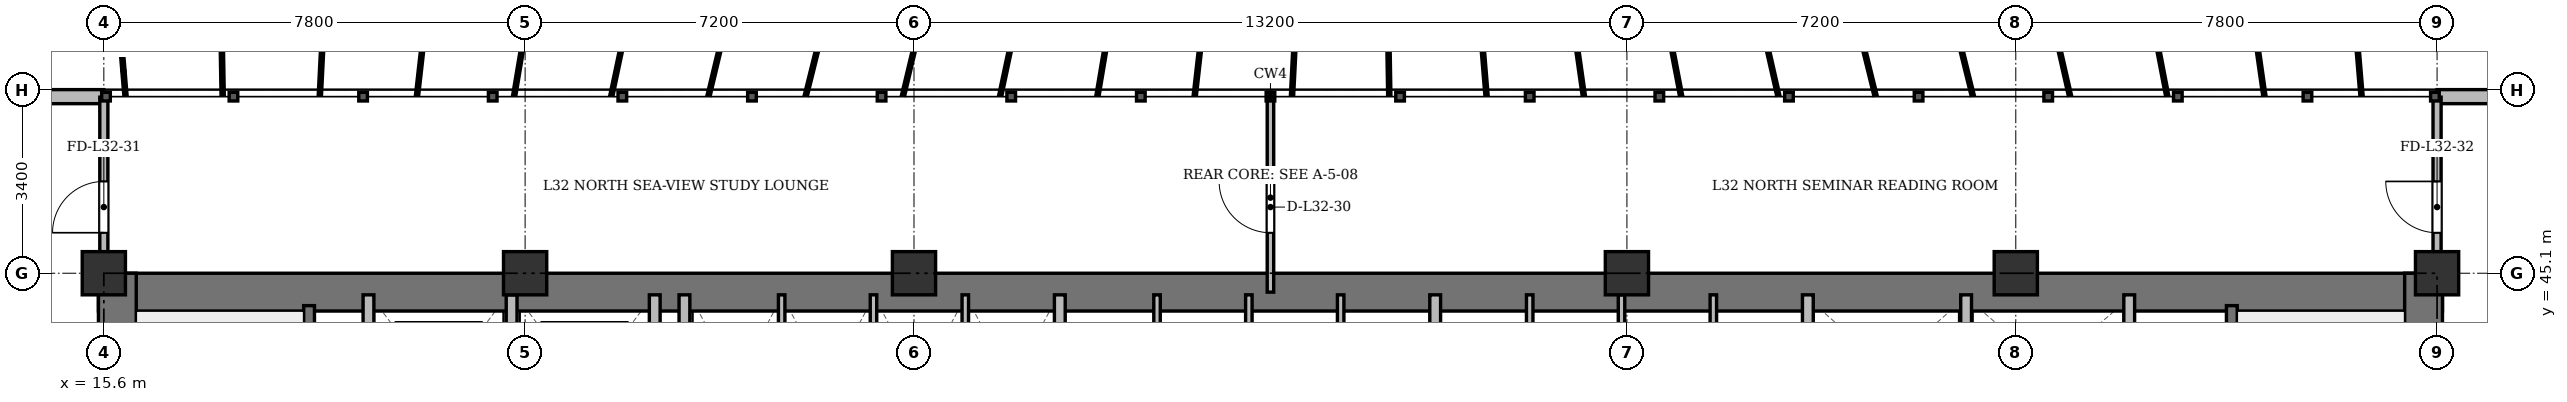
"""IFC4 building model, lengths in metres.
Left out: names, types, materials, properties, quantities, classifications, styles, units other than length and angle.
Written with IfcOpenShell. Run it as: python <this file> out.ifc"""

import sys

from ifc_helpers import new_model, si_unit, direction, frame, frame_2d, origin, origin_2d, place, context, subcontext, project, spatial, rectangle, extrude, source, transform, mapped, element, fill, save


model = new_model("IFC4")
c1 = context("Model", 3, precision=1e-05, world=origin(), true_north=direction((0.0, 1.0)))
c2 = subcontext(c1, "Body", "Model", "MODEL_VIEW")
j1 = project(units=[si_unit("LENGTHUNIT", "METRE"), si_unit("PLANEANGLEUNIT", "RADIAN")], contexts=[c1])
p1 = place(None, origin())
s1 = spatial("IfcSite", under=j1, at=p1, CompositionType="ELEMENT")
p2 = place(p1, origin())
s2 = spatial("IfcBuilding", under=s1, at=p2, CompositionType="ELEMENT")
p3 = place(p2, frame((0.0, 0.0, 124.9)))
s3 = spatial("IfcBuildingStorey", under=s2, at=p3, CompositionType="ELEMENT", Elevation=124.9)
m1 = source(origin(), c2, "Body", "SweptSolid", [
    extrude(rectangle(XDim=0.8, YDim=0.8, at=origin_2d()), origin(), (0.0, 0.0, 1.0), 3.6),
])
for number, where, z_axis, x_axis in (
    (1, (15.6, 45.1, 0.0), (0.0, 0.0, 1.0), (1.0, 0.0, 0.0)),
    (2, (23.4, 45.1, 0.0), (0.0, 0.0, 1.0), (1.0, 0.0, 0.0)),
    (3, (30.6, 45.1, 0.0), (0.0, 0.0, 1.0), (1.0, 0.0, 0.0)),
    (4, (43.8, 45.1, 0.0), (0.0, 0.0, 1.0), (1.0, 0.0, 0.0)),
    (5, (51.0, 45.1, 0.0), (0.0, 0.0, 1.0), (1.0, 0.0, 0.0)),
    (6, (58.8, 45.1, 0.0), (0.0, 0.0, 1.0), (1.0, 0.0, 0.0)),
):
    element("IfcColumn", number, at=place(p3, frame(where, z_axis=z_axis, x_axis=x_axis)), inside=s3, PredefinedType="COLUMN", context=c2, shape_type="MappedRepresentation", body=[
        mapped(m1, transform((0.0, 0.0, 0.0), x_axis=(1.0, 0.0, 0.0), y_axis=(0.0, 1.0, 0.0), z_axis=(0.0, 0.0, 1.0), scale=1.0)),
    ])
p4 = place(p3, frame((7.6, 48.37, 0.0), z_axis=(0.0, 0.0, 1.0), x_axis=(1.0, 0.0, 0.0)))
e7 = element("IfcWall", 7, at=p4, inside=s3, PredefinedType="SOLIDWALL", context=c2, shape_type="SweptSolid", body=[
    extrude(rectangle(XDim=8.0, YDim=0.26, at=frame_2d((4.0, 0.0))), origin(), (0.0, 0.0, 1.0), 3.34),
])
p5 = place(p4, frame((3.308, 0.0, 0.9)))
e8 = element("IfcOpeningElement", 8, at=p5, cuts=e7, PredefinedType="OPENING", context=c2, shape_type="SweptSolid", body=[
    extrude(rectangle(XDim=1.2, YDim=1.65, at=frame_2d((0.6, 0.825))), frame((0.0, 0.14, 0.0), z_axis=(0.0, -1.0, 0.0), x_axis=(1.0, 0.0, 0.0)), (0.0, 0.0, 1.0), 0.28),
])
p6 = place(p3, frame((58.8, 48.37, 0.0), z_axis=(0.0, 0.0, 1.0), x_axis=(1.0, 0.0, 0.0)))
e9 = element("IfcWall", 9, at=p6, inside=s3, PredefinedType="SOLIDWALL", context=c2, shape_type="SweptSolid", body=[
    extrude(rectangle(XDim=8.0, YDim=0.26, at=frame_2d((4.0, 0.0))), origin(), (0.0, 0.0, 1.0), 3.34),
])
p7 = place(p6, frame((2.192, 0.0, 0.9)))
e10 = element("IfcOpeningElement", 10, at=p7, cuts=e9, PredefinedType="OPENING", context=c2, shape_type="SweptSolid", body=[
    extrude(rectangle(XDim=1.2, YDim=1.65, at=frame_2d((0.6, 0.825))), frame((0.0, 0.14, 0.0), z_axis=(0.0, -1.0, 0.0), x_axis=(1.0, 0.0, 0.0)), (0.0, 0.0, 1.0), 0.28),
])
p8 = place(p6, frame((6.033, 0.0, 0.9)))
e11 = element("IfcOpeningElement", 11, at=p8, cuts=e9, PredefinedType="OPENING", context=c2, shape_type="SweptSolid", body=[
    extrude(rectangle(XDim=1.2, YDim=1.65, at=frame_2d((0.6, 0.825))), frame((0.0, 0.14, 0.0), z_axis=(0.0, -1.0, 0.0), x_axis=(1.0, 0.0, 0.0)), (0.0, 0.0, 1.0), 0.28),
])
p9 = place(p3, frame((15.5, 44.75, 0.0), z_axis=(0.0, 0.0, 1.0), x_axis=(1.0, 0.0, 0.0)))
e12 = element("IfcWall", 12, at=p9, inside=s3, PredefinedType="SHEAR", context=c2, shape_type="SweptSolid", body=[
    extrude(rectangle(XDim=43.4, YDim=0.7, at=frame_2d((21.7, 0.0))), origin(), (0.0, 0.0, 1.0), 3.34),
])
for number, where, z_axis, x_axis in (
    (13, (15.85, 33.4, 0.0), (0.0, 0.0, 1.0), (0.0, 1.0, 0.0)),
    (14, (58.55, 33.4, 0.0), (0.0, 0.0, 1.0), (0.0, 1.0, 0.0)),
):
    element("IfcWall", number, at=place(p3, frame(where, z_axis=z_axis, x_axis=x_axis)), inside=s3, PredefinedType="SHEAR", context=c2, shape_type="SweptSolid", body=[
        extrude(rectangle(XDim=11.7, YDim=0.7, at=frame_2d((5.85, 0.0))), origin(), (0.0, 0.0, 1.0), 3.34),
    ])
p10 = place(p3, frame((19.4, 33.4, 0.0), z_axis=(0.0, 0.0, 1.0), x_axis=(0.0, 1.0, 0.0)))
e15 = element("IfcWall", 15, at=p10, inside=s3, PredefinedType="SHEAR", context=c2, shape_type="SweptSolid", body=[
    extrude(rectangle(XDim=11.1, YDim=0.2, at=frame_2d((5.55, 0.0))), origin(), (0.0, 0.0, 1.0), 3.34),
])
p11 = place(p10, frame((0.85, 0.0, 0.0)))
e16 = element("IfcOpeningElement", 16, at=p11, cuts=e15, PredefinedType="OPENING", context=c2, shape_type="SweptSolid", body=[
    extrude(rectangle(XDim=1.1, YDim=2.15, at=frame_2d((0.55, 1.075))), frame((0.0, 0.11, 0.0), z_axis=(0.0, -1.0, 0.0), x_axis=(1.0, 0.0, 0.0)), (0.0, 0.0, 1.0), 0.22),
])
p12 = place(p3, frame((55.0, 33.4, 0.0), z_axis=(0.0, 0.0, 1.0), x_axis=(0.0, 1.0, 0.0)))
e17 = element("IfcWall", 17, at=p12, inside=s3, PredefinedType="SHEAR", context=c2, shape_type="SweptSolid", body=[
    extrude(rectangle(XDim=11.1, YDim=0.2, at=frame_2d((5.55, 0.0))), origin(), (0.0, 0.0, 1.0), 3.34),
])
p13 = place(p12, frame((0.85, 0.0, 0.0)))
e18 = element("IfcOpeningElement", 18, at=p13, cuts=e17, PredefinedType="OPENING", context=c2, shape_type="SweptSolid", body=[
    extrude(rectangle(XDim=1.1, YDim=2.15, at=frame_2d((0.55, 1.075))), frame((0.0, 0.11, 0.0), z_axis=(0.0, -1.0, 0.0), x_axis=(1.0, 0.0, 0.0)), (0.0, 0.0, 1.0), 0.22),
])
for number, where, z_axis, x_axis in (
    (19, (20.5, 41.3, 0.0), (0.0, 0.0, 1.0), (0.0, 1.0, 0.0)),
    (20, (23.15, 41.3, 0.0), (0.0, 0.0, 1.0), (0.0, 1.0, 0.0)),
    (21, (25.8, 41.3, 0.0), (0.0, 0.0, 1.0), (0.0, 1.0, 0.0)),
):
    element("IfcWall", number, at=place(p3, frame(where, z_axis=z_axis, x_axis=x_axis)), inside=s3, PredefinedType="SOLIDWALL", context=c2, shape_type="SweptSolid", body=[
        extrude(rectangle(XDim=3.4, YDim=0.2, at=frame_2d((1.7, 0.0))), origin(), (0.0, 0.0, 1.0), 3.34),
    ])
p14 = place(p3, frame((26.35, 33.4, 0.0), z_axis=(0.0, 0.0, 1.0), x_axis=(0.0, 1.0, 0.0)))
e22 = element("IfcWall", 22, at=p14, inside=s3, PredefinedType="SOLIDWALL", context=c2, shape_type="SweptSolid", body=[
    extrude(rectangle(XDim=11.3, YDim=0.2, at=frame_2d((5.65, 0.0))), origin(), (0.0, 0.0, 1.0), 2.752),
])
p15 = place(p3, frame((33.3, 41.5, 0.0), z_axis=(0.0, 0.0, 1.0), x_axis=(0.0, 1.0, 0.0)))
e23 = element("IfcWall", 23, at=p15, inside=s3, PredefinedType="SOLIDWALL", context=c2, shape_type="SweptSolid", body=[
    extrude(rectangle(XDim=3.2, YDim=0.2, at=frame_2d((1.6, 0.0))), origin(), (0.0, 0.0, 1.0), 3.34),
])
for number, where, z_axis, x_axis in (
    (24, (28.15, 41.5, 0.0), (0.0, 0.0, 1.0), (0.0, 1.0, 0.0)),
    (25, (29.85, 41.5, 0.0), (0.0, 0.0, 1.0), (0.0, 1.0, 0.0)),
    (26, (31.55, 41.5, 0.0), (0.0, 0.0, 1.0), (0.0, 1.0, 0.0)),
    (27, (35.1, 41.5, 0.0), (0.0, 0.0, 1.0), (0.0, 1.0, 0.0)),
    (28, (36.8, 41.5, 0.0), (0.0, 0.0, 1.0), (0.0, 1.0, 0.0)),
    (29, (38.5, 41.5, 0.0), (0.0, 0.0, 1.0), (0.0, 1.0, 0.0)),
):
    element("IfcWall", number, at=place(p3, frame(where, z_axis=z_axis, x_axis=x_axis)), inside=s3, PredefinedType="PARTITIONING", context=c2, shape_type="SweptSolid", body=[
        extrude(rectangle(XDim=3.2, YDim=0.12, at=frame_2d((1.6, 0.0))), origin(), (0.0, 0.0, 1.0), 3.34),
    ])
p16 = place(p3, frame((40.25, 41.5, 0.0), z_axis=(0.0, 0.0, 1.0), x_axis=(0.0, 1.0, 0.0)))
e30 = element("IfcWall", 30, at=p16, inside=s3, PredefinedType="SOLIDWALL", context=c2, shape_type="SweptSolid", body=[
    extrude(rectangle(XDim=3.2, YDim=0.2, at=frame_2d((1.6, 0.0))), origin(), (0.0, 0.0, 1.0), 3.34),
])
for number, where, z_axis, x_axis in (
    (31, (42.0, 41.5, 0.0), (0.0, 0.0, 1.0), (0.0, 1.0, 0.0)),
    (32, (43.7, 41.5, 0.0), (0.0, 0.0, 1.0), (0.0, 1.0, 0.0)),
    (33, (45.4, 41.5, 0.0), (0.0, 0.0, 1.0), (0.0, 1.0, 0.0)),
):
    element("IfcWall", number, at=place(p3, frame(where, z_axis=z_axis, x_axis=x_axis)), inside=s3, PredefinedType="PARTITIONING", context=c2, shape_type="SweptSolid", body=[
        extrude(rectangle(XDim=3.2, YDim=0.12, at=frame_2d((1.6, 0.0))), origin(), (0.0, 0.0, 1.0), 3.34),
    ])
p17 = place(p3, frame((47.15, 33.4, 0.0), z_axis=(0.0, 0.0, 1.0), x_axis=(0.0, 1.0, 0.0)))
e34 = element("IfcWall", 34, at=p17, inside=s3, PredefinedType="SOLIDWALL", context=c2, shape_type="SweptSolid", body=[
    extrude(rectangle(XDim=11.3, YDim=0.2, at=frame_2d((5.65, 0.0))), origin(), (0.0, 0.0, 1.0), 2.752),
])
for number, where, z_axis, x_axis in (
    (35, (50.08, 42.05, 0.0), (0.0, 0.0, 1.0), (0.0, 1.0, 0.0)),
    (36, (53.1, 42.05, 0.0), (0.0, 0.0, 1.0), (0.0, 1.0, 0.0)),
):
    element("IfcWall", number, at=place(p3, frame(where, z_axis=z_axis, x_axis=x_axis)), inside=s3, PredefinedType="SOLIDWALL", context=c2, shape_type="SweptSolid", body=[
        extrude(rectangle(XDim=2.65, YDim=0.2, at=frame_2d((1.325, 0.0))), origin(), (0.0, 0.0, 1.0), 3.34),
    ])
p18 = place(p3, frame((37.2, 44.75, 0.0), z_axis=(0.0, 0.0, 1.0), x_axis=(0.0, 1.0, 0.0)))
e37 = element("IfcWall", 37, at=p18, inside=s3, PredefinedType="PARTITIONING", context=c2, shape_type="SweptSolid", body=[
    extrude(rectangle(XDim=3.61, YDim=0.12, at=frame_2d((1.805, 0.0))), origin(), (0.0, 0.0, 1.0), 2.752),
])
p19 = place(p18, frame((1.1, 0.0, 0.0)))
e38 = element("IfcOpeningElement", 38, at=p19, cuts=e37, PredefinedType="OPENING", context=c2, shape_type="SweptSolid", body=[
    extrude(rectangle(XDim=0.95, YDim=2.15, at=frame_2d((0.475, 1.075))), frame((0.0, 0.07, 0.0), z_axis=(0.0, -1.0, 0.0), x_axis=(1.0, 0.0, 0.0)), (0.0, 0.0, 1.0), 0.14),
])
p20 = place(p3, frame((15.6, 44.75, 0.0), z_axis=(0.0, 0.0, 1.0), x_axis=(0.0, 1.0, 0.0)))
e39 = element("IfcWall", 39, at=p20, inside=s3, PredefinedType="PARTITIONING", context=c2, shape_type="SweptSolid", body=[
    extrude(rectangle(XDim=3.61, YDim=0.15, at=frame_2d((1.805, 0.0))), origin(), (0.0, 0.0, 1.0), 2.84),
])
p21 = place(p20, frame((1.1, 0.0, 0.0)))
e40 = element("IfcOpeningElement", 40, at=p21, cuts=e39, PredefinedType="OPENING", context=c2, shape_type="SweptSolid", body=[
    extrude(rectangle(XDim=0.95, YDim=2.15, at=frame_2d((0.475, 1.075))), frame((0.0, 0.085, 0.0), z_axis=(0.0, -1.0, 0.0), x_axis=(1.0, 0.0, 0.0)), (0.0, 0.0, 1.0), 0.17),
])
p22 = place(p3, frame((58.8, 44.75, 0.0), z_axis=(0.0, 0.0, 1.0), x_axis=(0.0, 1.0, 0.0)))
e41 = element("IfcWall", 41, at=p22, inside=s3, PredefinedType="PARTITIONING", context=c2, shape_type="SweptSolid", body=[
    extrude(rectangle(XDim=3.61, YDim=0.15, at=frame_2d((1.805, 0.0))), origin(), (0.0, 0.0, 1.0), 2.84),
])
p23 = place(p22, frame((1.1, 0.0, 0.0)))
e42 = element("IfcOpeningElement", 42, at=p23, cuts=e41, PredefinedType="OPENING", context=c2, shape_type="SweptSolid", body=[
    extrude(rectangle(XDim=0.95, YDim=2.15, at=frame_2d((0.475, 1.075))), frame((0.0, 0.085, 0.0), z_axis=(0.0, -1.0, 0.0), x_axis=(1.0, 0.0, 0.0)), (0.0, 0.0, 1.0), 0.17),
])
m2 = source(origin(), c2, "Body", "SweptSolid", [
    extrude(rectangle(XDim=0.95, YDim=2.15, at=frame_2d((0.475, 1.075))), frame((0.0, 0.025, 0.0), z_axis=(0.0, -1.0, 0.0), x_axis=(1.0, 0.0, 0.0)), (0.0, 0.0, 1.0), 0.05),
])
p24 = place(p19, origin())
e43 = element("IfcDoor", 43, at=p24, inside=s3, OperationType="SINGLE_SWING_RIGHT", PredefinedType="DOOR", context=c2, shape_type="MappedRepresentation", body=[
    mapped(m2, transform((0.0, 0.0, 0.0), x_axis=(1.0, 0.0, 0.0), y_axis=(0.0, 1.0, 0.0), z_axis=(0.0, 0.0, 1.0), scale=1.0)),
])
fill(e38, e43)
p25 = place(p21, origin())
e44 = element("IfcDoor", 44, at=p25, inside=s3, OperationType="SINGLE_SWING_LEFT", PredefinedType="DOOR", context=c2, shape_type="MappedRepresentation", body=[
    mapped(m2, transform((0.0, 0.0, 0.0), x_axis=(1.0, 0.0, 0.0), y_axis=(0.0, 1.0, 0.0), z_axis=(0.0, 0.0, 1.0), scale=1.0)),
])
fill(e40, e44)
p26 = place(p23, origin())
e45 = element("IfcDoor", 45, at=p26, inside=s3, OperationType="SINGLE_SWING_RIGHT", PredefinedType="DOOR", context=c2, shape_type="MappedRepresentation", body=[
    mapped(m2, transform((0.0, 0.0, 0.0), x_axis=(1.0, 0.0, 0.0), y_axis=(0.0, 1.0, 0.0), z_axis=(0.0, 0.0, 1.0), scale=1.0)),
])
fill(e42, e45)
save(model, sys.argv[1])
